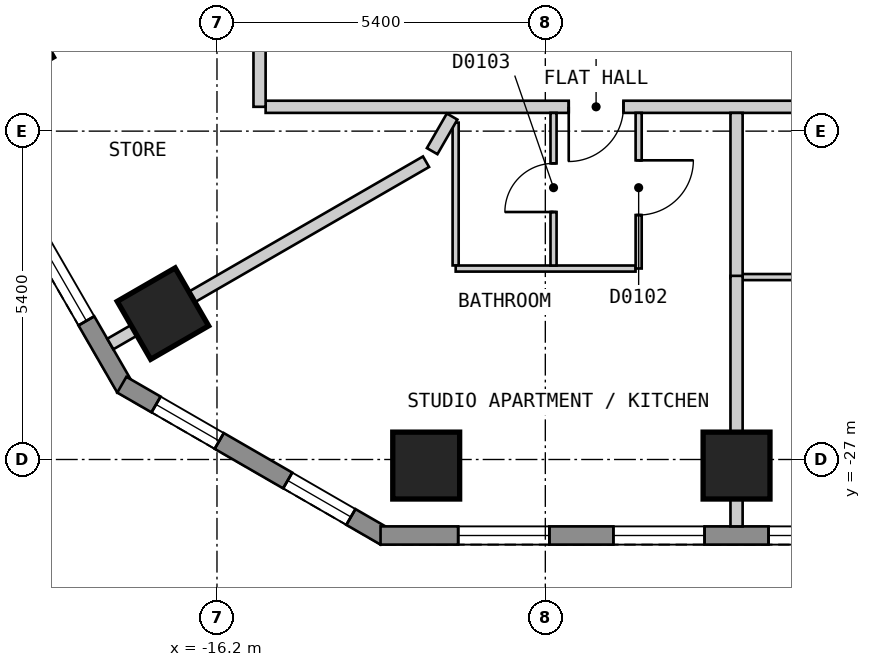
"""IFC4 building model, lengths in metres.
Left out: names, types, materials, properties, quantities, classifications, styles, units other than length and angle.
Written with IfcOpenShell. Run it as: python <this file> out.ifc"""

import sys

from ifc_helpers import new_model, si_unit, direction, frame, frame_2d, origin, origin_2d, place, context, subcontext, project, spatial, polyline, rectangle, outline, extrude, element, fill, save


model = new_model("IFC4")
c1 = context("Model", 3, precision=1e-05, world=origin(), true_north=direction((0.0, 1.0)))
c2 = subcontext(c1, "Body", "Model", "MODEL_VIEW")
j1 = project(units=[si_unit("LENGTHUNIT", "METRE"), si_unit("PLANEANGLEUNIT", "RADIAN")], contexts=[c1])
p1 = place(None, origin())
s1 = spatial("IfcSite", under=j1, at=p1, CompositionType="ELEMENT")
p2 = place(p1, origin())
s2 = spatial("IfcBuilding", under=s1, at=p2, CompositionType="ELEMENT")
p3 = place(p2, frame((0.0, 0.0, 23.4)))
s3 = spatial("IfcBuildingStorey", under=s2, at=p3, CompositionType="ELEMENT", Elevation=23.4)
for number, where, z_axis, x_axis in (
    (1, (-19.641, -20.181, 0.0), (0.0, 0.0, 1.0), (0.5, -0.866, 0.0)),
    (2, (-17.089, -24.601, 0.0), (0.0, 0.0, 1.0), (0.5, -0.866, 0.0)),
    (3, (-12.759, -27.1, 0.0), (0.0, 0.0, 1.0), (1.0, 0.0, 0.0)),
    (4, (-7.655, -27.1, 0.0), (0.0, 0.0, 1.0), (1.0, 0.0, 0.0)),
):
    element("IfcColumn", number, at=place(p3, frame(where, z_axis=z_axis, x_axis=x_axis)), inside=s3, PredefinedType="COLUMN", context=c2, shape_type="SweptSolid", body=[
        extrude(rectangle(XDim=1.1, YDim=1.1, at=origin_2d()), origin(), (0.0, 0.0, 1.0), 3.0),
    ])
p4 = place(p3, frame((-31.22, -2.425, 0.0), z_axis=(0.0, 0.0, 1.0), x_axis=(0.500001938803, -0.866024284413, 0.0)))
e5 = element("IfcWall", 5, at=p4, inside=s3, PredefinedType="SOLIDWALL", context=c2, shape_type="SweptSolid", body=[
    extrude(outline(polyline([(0.0, -0.15), (27.02, -0.15), (26.94, 0.15), (0.08, 0.15), (0.0, -0.15)])), origin(), (0.0, 0.0, 1.0), 2.7),
])
p5 = place(p4, frame((1.277, 0.0, 0.15)))
e6 = element("IfcOpeningElement", 6, at=p5, cuts=e5, PredefinedType="OPENING", context=c2, shape_type="SweptSolid", body=[
    extrude(rectangle(XDim=1.5, YDim=2.1, at=frame_2d((0.75, 1.05))), frame((0.0, 0.16, 0.0), z_axis=(0.0, -1.0, 0.0), x_axis=(1.0, 0.0, 0.0)), (0.0, 0.0, 1.0), 0.32),
])
p6 = place(p4, frame((3.829, 0.0, 0.15)))
e7 = element("IfcOpeningElement", 7, at=p6, cuts=e5, PredefinedType="OPENING", context=c2, shape_type="SweptSolid", body=[
    extrude(rectangle(XDim=1.5, YDim=2.1, at=frame_2d((0.75, 1.05))), frame((0.0, 0.16, 0.0), z_axis=(0.0, -1.0, 0.0), x_axis=(1.0, 0.0, 0.0)), (0.0, 0.0, 1.0), 0.32),
])
p7 = place(p4, frame((6.382, 0.0, 0.15)))
e8 = element("IfcOpeningElement", 8, at=p7, cuts=e5, PredefinedType="OPENING", context=c2, shape_type="SweptSolid", body=[
    extrude(rectangle(XDim=1.5, YDim=2.1, at=frame_2d((0.75, 1.05))), frame((0.0, 0.16, 0.0), z_axis=(0.0, -1.0, 0.0), x_axis=(1.0, 0.0, 0.0)), (0.0, 0.0, 1.0), 0.32),
])
p8 = place(p4, frame((8.933, 0.0, 0.15)))
e9 = element("IfcOpeningElement", 9, at=p8, cuts=e5, PredefinedType="OPENING", context=c2, shape_type="SweptSolid", body=[
    extrude(rectangle(XDim=1.5, YDim=2.1, at=frame_2d((0.75, 1.05))), frame((0.0, 0.16, 0.0), z_axis=(0.0, -1.0, 0.0), x_axis=(1.0, 0.0, 0.0)), (0.0, 0.0, 1.0), 0.32),
])
p9 = place(p4, frame((11.485, 0.0, 0.15)))
e10 = element("IfcOpeningElement", 10, at=p9, cuts=e5, PredefinedType="OPENING", context=c2, shape_type="SweptSolid", body=[
    extrude(rectangle(XDim=1.5, YDim=2.1, at=frame_2d((0.75, 1.05))), frame((0.0, 0.16, 0.0), z_axis=(0.0, -1.0, 0.0), x_axis=(1.0, 0.0, 0.0)), (0.0, 0.0, 1.0), 0.32),
])
p10 = place(p4, frame((14.037, 0.0, 0.15)))
e11 = element("IfcOpeningElement", 11, at=p10, cuts=e5, PredefinedType="OPENING", context=c2, shape_type="SweptSolid", body=[
    extrude(rectangle(XDim=1.5, YDim=2.1, at=frame_2d((0.75, 1.05))), frame((0.0, 0.16, 0.0), z_axis=(0.0, -1.0, 0.0), x_axis=(1.0, 0.0, 0.0)), (0.0, 0.0, 1.0), 0.32),
])
p11 = place(p4, frame((16.589, 0.0, 0.15)))
e12 = element("IfcOpeningElement", 12, at=p11, cuts=e5, PredefinedType="OPENING", context=c2, shape_type="SweptSolid", body=[
    extrude(rectangle(XDim=1.5, YDim=2.1, at=frame_2d((0.75, 1.05))), frame((0.0, 0.16, 0.0), z_axis=(0.0, -1.0, 0.0), x_axis=(1.0, 0.0, 0.0)), (0.0, 0.0, 1.0), 0.32),
])
p12 = place(p4, frame((19.141, 0.0, 0.15)))
e13 = element("IfcOpeningElement", 13, at=p12, cuts=e5, PredefinedType="OPENING", context=c2, shape_type="SweptSolid", body=[
    extrude(rectangle(XDim=1.5, YDim=2.1, at=frame_2d((0.75, 1.05))), frame((0.0, 0.16, 0.0), z_axis=(0.0, -1.0, 0.0), x_axis=(1.0, 0.0, 0.0)), (0.0, 0.0, 1.0), 0.32),
])
p13 = place(p4, frame((21.693, 0.0, 0.15)))
e14 = element("IfcOpeningElement", 14, at=p13, cuts=e5, PredefinedType="OPENING", context=c2, shape_type="SweptSolid", body=[
    extrude(rectangle(XDim=1.5, YDim=2.1, at=frame_2d((0.75, 1.05))), frame((0.0, 0.16, 0.0), z_axis=(0.0, -1.0, 0.0), x_axis=(1.0, 0.0, 0.0)), (0.0, 0.0, 1.0), 0.32),
])
p14 = place(p4, frame((24.244, 0.0, 0.15)))
e15 = element("IfcOpeningElement", 15, at=p14, cuts=e5, PredefinedType="OPENING", context=c2, shape_type="SweptSolid", body=[
    extrude(rectangle(XDim=1.5, YDim=2.1, at=frame_2d((0.75, 1.05))), frame((0.0, 0.16, 0.0), z_axis=(0.0, -1.0, 0.0), x_axis=(1.0, 0.0, 0.0)), (0.0, 0.0, 1.0), 0.32),
])
p15 = place(p3, frame((-17.765, -25.77, 0.0), z_axis=(0.0, 0.0, 1.0), x_axis=(0.866010750942, -0.50002537861, 0.0)))
e16 = element("IfcWall", 16, at=p15, inside=s3, PredefinedType="SOLIDWALL", context=c2, shape_type="SweptSolid", body=[
    extrude(outline(polyline([(0.0, -0.15), (5.0, -0.15), (4.919, 0.15), (0.08, 0.15), (0.0, -0.15)])), origin(), (0.0, 0.0, 1.0), 2.7),
])
p16 = place(p15, frame((0.65, 0.0, 0.15)))
e17 = element("IfcOpeningElement", 17, at=p16, cuts=e16, PredefinedType="OPENING", context=c2, shape_type="SweptSolid", body=[
    extrude(rectangle(XDim=1.2, YDim=2.1, at=frame_2d((0.6, 1.05))), frame((0.0, 0.16, 0.0), z_axis=(0.0, -1.0, 0.0), x_axis=(1.0, 0.0, 0.0)), (0.0, 0.0, 1.0), 0.32),
])
p17 = place(p15, frame((3.15, 0.0, 0.15)))
e18 = element("IfcOpeningElement", 18, at=p17, cuts=e16, PredefinedType="OPENING", context=c2, shape_type="SweptSolid", body=[
    extrude(rectangle(XDim=1.2, YDim=2.1, at=frame_2d((0.6, 1.05))), frame((0.0, 0.16, 0.0), z_axis=(0.0, -1.0, 0.0), x_axis=(1.0, 0.0, 0.0)), (0.0, 0.0, 1.0), 0.32),
])
p18 = place(p3, frame((-13.51, -28.25, 0.0), z_axis=(0.0, 0.0, 1.0), x_axis=(1.0, 0.0, 0.0)))
e19 = element("IfcWall", 19, at=p18, inside=s3, PredefinedType="SOLIDWALL", context=c2, shape_type="SweptSolid", body=[
    extrude(outline(polyline([(0.0, -0.15), (27.02, -0.15), (26.94, 0.15), (0.08, 0.15), (0.0, -0.15)])), origin(), (0.0, 0.0, 1.0), 2.7),
])
p19 = place(p18, frame((1.277, 0.0, 0.15)))
e20 = element("IfcOpeningElement", 20, at=p19, cuts=e19, PredefinedType="OPENING", context=c2, shape_type="SweptSolid", body=[
    extrude(rectangle(XDim=1.5, YDim=2.1, at=frame_2d((0.75, 1.05))), frame((0.0, 0.16, 0.0), z_axis=(0.0, -1.0, 0.0), x_axis=(1.0, 0.0, 0.0)), (0.0, 0.0, 1.0), 0.32),
])
p20 = place(p18, frame((3.829, 0.0, 0.15)))
e21 = element("IfcOpeningElement", 21, at=p20, cuts=e19, PredefinedType="OPENING", context=c2, shape_type="SweptSolid", body=[
    extrude(rectangle(XDim=1.5, YDim=2.1, at=frame_2d((0.75, 1.05))), frame((0.0, 0.16, 0.0), z_axis=(0.0, -1.0, 0.0), x_axis=(1.0, 0.0, 0.0)), (0.0, 0.0, 1.0), 0.32),
])
p21 = place(p18, frame((6.381, 0.0, 0.15)))
e22 = element("IfcOpeningElement", 22, at=p21, cuts=e19, PredefinedType="OPENING", context=c2, shape_type="SweptSolid", body=[
    extrude(rectangle(XDim=1.5, YDim=2.1, at=frame_2d((0.75, 1.05))), frame((0.0, 0.16, 0.0), z_axis=(0.0, -1.0, 0.0), x_axis=(1.0, 0.0, 0.0)), (0.0, 0.0, 1.0), 0.32),
])
p22 = place(p18, frame((8.933, 0.0, 0.15)))
e23 = element("IfcOpeningElement", 23, at=p22, cuts=e19, PredefinedType="OPENING", context=c2, shape_type="SweptSolid", body=[
    extrude(rectangle(XDim=1.5, YDim=2.1, at=frame_2d((0.75, 1.05))), frame((0.0, 0.16, 0.0), z_axis=(0.0, -1.0, 0.0), x_axis=(1.0, 0.0, 0.0)), (0.0, 0.0, 1.0), 0.32),
])
p23 = place(p18, frame((11.485, 0.0, 0.15)))
e24 = element("IfcOpeningElement", 24, at=p23, cuts=e19, PredefinedType="OPENING", context=c2, shape_type="SweptSolid", body=[
    extrude(rectangle(XDim=1.5, YDim=2.1, at=frame_2d((0.75, 1.05))), frame((0.0, 0.16, 0.0), z_axis=(0.0, -1.0, 0.0), x_axis=(1.0, 0.0, 0.0)), (0.0, 0.0, 1.0), 0.32),
])
p24 = place(p18, frame((14.037, 0.0, 0.15)))
e25 = element("IfcOpeningElement", 25, at=p24, cuts=e19, PredefinedType="OPENING", context=c2, shape_type="SweptSolid", body=[
    extrude(rectangle(XDim=1.5, YDim=2.1, at=frame_2d((0.75, 1.05))), frame((0.0, 0.16, 0.0), z_axis=(0.0, -1.0, 0.0), x_axis=(1.0, 0.0, 0.0)), (0.0, 0.0, 1.0), 0.32),
])
p25 = place(p18, frame((16.589, 0.0, 0.15)))
e26 = element("IfcOpeningElement", 26, at=p25, cuts=e19, PredefinedType="OPENING", context=c2, shape_type="SweptSolid", body=[
    extrude(rectangle(XDim=1.5, YDim=2.1, at=frame_2d((0.75, 1.05))), frame((0.0, 0.16, 0.0), z_axis=(0.0, -1.0, 0.0), x_axis=(1.0, 0.0, 0.0)), (0.0, 0.0, 1.0), 0.32),
])
p26 = place(p18, frame((19.141, 0.0, 0.15)))
e27 = element("IfcOpeningElement", 27, at=p26, cuts=e19, PredefinedType="OPENING", context=c2, shape_type="SweptSolid", body=[
    extrude(rectangle(XDim=1.5, YDim=2.1, at=frame_2d((0.75, 1.05))), frame((0.0, 0.16, 0.0), z_axis=(0.0, -1.0, 0.0), x_axis=(1.0, 0.0, 0.0)), (0.0, 0.0, 1.0), 0.32),
])
p27 = place(p18, frame((21.693, 0.0, 0.15)))
e28 = element("IfcOpeningElement", 28, at=p27, cuts=e19, PredefinedType="OPENING", context=c2, shape_type="SweptSolid", body=[
    extrude(rectangle(XDim=1.5, YDim=2.1, at=frame_2d((0.75, 1.05))), frame((0.0, 0.16, 0.0), z_axis=(0.0, -1.0, 0.0), x_axis=(1.0, 0.0, 0.0)), (0.0, 0.0, 1.0), 0.32),
])
p28 = place(p18, frame((24.245, 0.0, 0.15)))
e29 = element("IfcOpeningElement", 29, at=p28, cuts=e19, PredefinedType="OPENING", context=c2, shape_type="SweptSolid", body=[
    extrude(rectangle(XDim=1.5, YDim=2.1, at=frame_2d((0.75, 1.05))), frame((0.0, 0.16, 0.0), z_axis=(0.0, -1.0, 0.0), x_axis=(1.0, 0.0, 0.0)), (0.0, 0.0, 1.0), 0.32),
])
p29 = place(p3, frame((-15.4, -21.2, 0.0), z_axis=(0.0, 0.0, 1.0), x_axis=(1.0, 0.0, 0.0)))
e30 = element("IfcWall", 30, at=p29, inside=s3, PredefinedType="PARTITIONING", context=c2, shape_type="SweptSolid", body=[
    extrude(rectangle(XDim=30.799, YDim=0.2, at=frame_2d((15.399, 0.0))), origin(), (0.0, 0.0, 1.0), 2.7),
])
p30 = place(p29, frame((4.985, 0.0, 0.0)))
e31 = element("IfcOpeningElement", 31, at=p30, cuts=e30, PredefinedType="OPENING", context=c2, shape_type="SweptSolid", body=[
    extrude(rectangle(XDim=0.9, YDim=2.1, at=frame_2d((0.45, 1.05))), frame((0.0, 0.11, 0.0), z_axis=(0.0, -1.0, 0.0), x_axis=(1.0, 0.0, 0.0)), (0.0, 0.0, 1.0), 0.22),
])
p31 = place(p29, frame((14.901, 0.0, 0.0)))
e32 = element("IfcOpeningElement", 32, at=p31, cuts=e30, PredefinedType="OPENING", context=c2, shape_type="SweptSolid", body=[
    extrude(rectangle(XDim=1.0, YDim=2.1, at=frame_2d((0.5, 1.05))), frame((0.0, 0.11, 0.0), z_axis=(0.0, -1.0, 0.0), x_axis=(1.0, 0.0, 0.0)), (0.0, 0.0, 1.0), 0.22),
])
p32 = place(p29, frame((20.005, 0.0, 0.0)))
e33 = element("IfcOpeningElement", 33, at=p32, cuts=e30, PredefinedType="OPENING", context=c2, shape_type="SweptSolid", body=[
    extrude(rectangle(XDim=1.0, YDim=2.1, at=frame_2d((0.5, 1.05))), frame((0.0, 0.11, 0.0), z_axis=(0.0, -1.0, 0.0), x_axis=(1.0, 0.0, 0.0)), (0.0, 0.0, 1.0), 0.22),
])
p33 = place(p29, frame((24.916, 0.0, 0.0)))
e34 = element("IfcOpeningElement", 34, at=p33, cuts=e30, PredefinedType="OPENING", context=c2, shape_type="SweptSolid", body=[
    extrude(rectangle(XDim=0.9, YDim=2.1, at=frame_2d((0.45, 1.05))), frame((0.0, 0.11, 0.0), z_axis=(0.0, -1.0, 0.0), x_axis=(1.0, 0.0, 0.0)), (0.0, 0.0, 1.0), 0.22),
])
p34 = place(p3, frame((-15.5, -21.2, 0.0), z_axis=(0.0, 0.0, 1.0), x_axis=(0.0, 1.0, 0.0)))
e35 = element("IfcWall", 35, at=p34, inside=s3, PredefinedType="PARTITIONING", context=c2, shape_type="SweptSolid", body=[
    extrude(rectangle(XDim=4.8, YDim=0.2, at=frame_2d((2.4, 0.0))), origin(), (0.0, 0.0, 1.0), 2.7),
])
p35 = place(p34, frame((1.258, 0.0, 0.0)))
e36 = element("IfcOpeningElement", 36, at=p35, cuts=e35, PredefinedType="OPENING", context=c2, shape_type="SweptSolid", body=[
    extrude(rectangle(XDim=0.8, YDim=2.1, at=frame_2d((0.4, 1.05))), frame((0.0, 0.11, 0.0), z_axis=(0.0, -1.0, 0.0), x_axis=(1.0, 0.0, 0.0)), (0.0, 0.0, 1.0), 0.22),
])
p36 = place(p3, frame((-12.275, -21.46, 0.0), z_axis=(0.0, 0.0, 1.0), x_axis=(0.0, -1.0, 0.0)))
e37 = element("IfcWall", 37, at=p36, inside=s3, PredefinedType="PARTITIONING", context=c2, shape_type="SweptSolid", body=[
    extrude(rectangle(XDim=2.349, YDim=0.1, at=frame_2d((1.175, 0.0))), origin(), (0.0, 0.0, 1.0), 2.7),
])
p37 = place(p3, frame((-12.274, -23.86, 0.0), z_axis=(0.0, 0.0, 1.0), x_axis=(1.0, 0.0, 0.0)))
e38 = element("IfcWall", 38, at=p37, inside=s3, PredefinedType="PARTITIONING", context=c2, shape_type="SweptSolid", body=[
    extrude(rectangle(XDim=2.958, YDim=0.1, at=frame_2d((1.479, 0.0))), origin(), (0.0, 0.0, 1.0), 2.7),
])
p38 = place(p3, frame((-7.555, -24.0, 0.0), z_axis=(0.0, 0.0, 1.0), x_axis=(1.0, 0.0, 0.0)))
e39 = element("IfcWall", 39, at=p38, inside=s3, PredefinedType="PARTITIONING", context=c2, shape_type="SweptSolid", body=[
    extrude(rectangle(XDim=4.954, YDim=0.1, at=frame_2d((2.477, 0.0))), origin(), (0.0, 0.0, 1.0), 2.7),
])
p39 = place(p38, frame((2.052, 0.0, 0.0)))
e40 = element("IfcOpeningElement", 40, at=p39, cuts=e39, PredefinedType="OPENING", context=c2, shape_type="SweptSolid", body=[
    extrude(rectangle(XDim=0.8, YDim=2.1, at=frame_2d((0.4, 1.05))), frame((0.0, 0.06, 0.0), z_axis=(0.0, -1.0, 0.0), x_axis=(1.0, 0.0, 0.0)), (0.0, 0.0, 1.0), 0.12),
])
p40 = place(p3, frame((-9.265, -23.859, 0.0), z_axis=(0.0, 0.0, 1.0), x_axis=(0.0, 1.0, 0.0)))
e41 = element("IfcWall", 41, at=p40, inside=s3, PredefinedType="PARTITIONING", context=c2, shape_type="SweptSolid", body=[
    extrude(rectangle(XDim=2.559, YDim=0.1, at=frame_2d((1.279, 0.0))), origin(), (0.0, 0.0, 1.0), 2.7),
])
p41 = place(p40, frame((0.879, 0.0, 0.0)))
e42 = element("IfcOpeningElement", 42, at=p41, cuts=e41, PredefinedType="OPENING", context=c2, shape_type="SweptSolid", body=[
    extrude(rectangle(XDim=0.9, YDim=2.1, at=frame_2d((0.45, 1.05))), frame((0.0, 0.06, 0.0), z_axis=(0.0, -1.0, 0.0), x_axis=(1.0, 0.0, 0.0)), (0.0, 0.0, 1.0), 0.12),
])
p42 = place(p3, frame((-10.665, -23.81, 0.0), z_axis=(0.0, 0.0, 1.0), x_axis=(0.0, 1.0, 0.0)))
e43 = element("IfcWall", 43, at=p42, inside=s3, PredefinedType="PARTITIONING", context=c2, shape_type="SweptSolid", body=[
    extrude(rectangle(XDim=2.51, YDim=0.1, at=frame_2d((1.255, 0.0))), origin(), (0.0, 0.0, 1.0), 2.7),
])
p43 = place(p42, frame((0.88, 0.0, 0.0)))
e44 = element("IfcOpeningElement", 44, at=p43, cuts=e43, PredefinedType="OPENING", context=c2, shape_type="SweptSolid", body=[
    extrude(rectangle(XDim=0.8, YDim=2.1, at=frame_2d((0.4, 1.05))), frame((0.0, 0.06, 0.0), z_axis=(0.0, -1.0, 0.0), x_axis=(1.0, 0.0, 0.0)), (0.0, 0.0, 1.0), 0.12),
])
p44 = place(p3, frame((-7.655, -21.3, 0.0), z_axis=(0.0, 0.0, 1.0), x_axis=(0.0, -1.0, 0.0)))
e45 = element("IfcWall", 45, at=p44, inside=s3, PredefinedType="PARTITIONING", context=c2, shape_type="SweptSolid", body=[
    extrude(rectangle(XDim=2.72, YDim=0.2, at=frame_2d((1.36, 0.0))), origin(), (0.0, 0.0, 1.0), 2.7),
])
p45 = place(p3, frame((-12.661, -21.929, 0.0), z_axis=(0.0, 0.0, 1.0), x_axis=(0.499379051742, 0.866383611734, 0.0)))
e46 = element("IfcWall", 46, at=p45, inside=s3, PredefinedType="PARTITIONING", context=c2, shape_type="SweptSolid", body=[
    extrude(rectangle(XDim=0.656, YDim=0.2, at=frame_2d((0.328, 0.0))), origin(), (0.0, 0.0, 1.0), 2.7),
])
p46 = place(p3, frame((-7.655, -28.1, 0.0), z_axis=(0.0, 0.0, 1.0), x_axis=(0.0, 1.0, 0.0)))
e47 = element("IfcWall", 47, at=p46, inside=s3, PredefinedType="PARTITIONING", context=c2, shape_type="SweptSolid", body=[
    extrude(rectangle(XDim=4.12, YDim=0.2, at=frame_2d((2.06, 0.0))), origin(), (0.0, 0.0, 1.0), 2.7),
])
p47 = place(p3, frame((-20.507, -20.681, 0.0), z_axis=(0.0, 0.0, 1.0), x_axis=(0.866028446103, 0.499994730513, 0.0)))
e48 = element("IfcWall", 48, at=p47, inside=s3, PredefinedType="PARTITIONING", context=c2, shape_type="SweptSolid", body=[
    extrude(rectangle(XDim=5.666, YDim=0.2, at=frame_2d((2.833, 0.0))), origin(), (0.0, 0.0, 1.0), 2.7),
])
p48 = place(p3, frame((-17.954, -25.101, 0.0), z_axis=(0.0, 0.0, 1.0), x_axis=(0.865999098103, 0.500045560009, 0.0)))
e49 = element("IfcWall", 49, at=p48, inside=s3, PredefinedType="PARTITIONING", context=c2, shape_type="SweptSolid", body=[
    extrude(rectangle(XDim=5.996, YDim=0.2, at=frame_2d((2.998, 0.0))), origin(), (0.0, 0.0, 1.0), 2.7),
])
p49 = place(p14, origin())
e50 = element("IfcWindow", 50, at=p49, inside=s3, PartitioningType="SINGLE_PANEL", PredefinedType="WINDOW", context=c2, shape_type="SweptSolid", body=[
    extrude(rectangle(XDim=1.5, YDim=2.1, at=frame_2d((0.75, 1.05))), frame((0.0, 0.03, 0.0), z_axis=(0.0, -1.0, 0.0), x_axis=(1.0, 0.0, 0.0)), (0.0, 0.0, 1.0), 0.06),
])
fill(e15, e50)
p50 = place(p16, origin())
e51 = element("IfcWindow", 51, at=p50, inside=s3, PartitioningType="SINGLE_PANEL", PredefinedType="WINDOW", context=c2, shape_type="SweptSolid", body=[
    extrude(rectangle(XDim=1.2, YDim=2.1, at=frame_2d((0.6, 1.05))), frame((0.0, 0.03, 0.0), z_axis=(0.0, -1.0, 0.0), x_axis=(1.0, 0.0, 0.0)), (0.0, 0.0, 1.0), 0.06),
])
fill(e17, e51)
p51 = place(p17, origin())
e52 = element("IfcWindow", 52, at=p51, inside=s3, PartitioningType="SINGLE_PANEL", PredefinedType="WINDOW", context=c2, shape_type="SweptSolid", body=[
    extrude(rectangle(XDim=1.2, YDim=2.1, at=frame_2d((0.6, 1.05))), frame((0.0, 0.03, 0.0), z_axis=(0.0, -1.0, 0.0), x_axis=(1.0, 0.0, 0.0)), (0.0, 0.0, 1.0), 0.06),
])
fill(e18, e52)
p52 = place(p19, origin())
e53 = element("IfcWindow", 53, at=p52, inside=s3, PartitioningType="SINGLE_PANEL", PredefinedType="WINDOW", context=c2, shape_type="SweptSolid", body=[
    extrude(rectangle(XDim=1.5, YDim=2.1, at=frame_2d((0.75, 1.05))), frame((0.0, 0.03, 0.0), z_axis=(0.0, -1.0, 0.0), x_axis=(1.0, 0.0, 0.0)), (0.0, 0.0, 1.0), 0.06),
])
fill(e20, e53)
p53 = place(p20, origin())
e54 = element("IfcWindow", 54, at=p53, inside=s3, PartitioningType="SINGLE_PANEL", PredefinedType="WINDOW", context=c2, shape_type="SweptSolid", body=[
    extrude(rectangle(XDim=1.5, YDim=2.1, at=frame_2d((0.75, 1.05))), frame((0.0, 0.03, 0.0), z_axis=(0.0, -1.0, 0.0), x_axis=(1.0, 0.0, 0.0)), (0.0, 0.0, 1.0), 0.06),
])
fill(e21, e54)
p54 = place(p21, origin())
e55 = element("IfcWindow", 55, at=p54, inside=s3, PartitioningType="SINGLE_PANEL", PredefinedType="WINDOW", context=c2, shape_type="SweptSolid", body=[
    extrude(rectangle(XDim=1.5, YDim=2.1, at=frame_2d((0.75, 1.05))), frame((0.0, 0.03, 0.0), z_axis=(0.0, -1.0, 0.0), x_axis=(1.0, 0.0, 0.0)), (0.0, 0.0, 1.0), 0.06),
])
fill(e22, e55)
p55 = place(p30, origin())
e56 = element("IfcDoor", 56, at=p55, inside=s3, OperationType="SINGLE_SWING_LEFT", PredefinedType="DOOR", context=c2, shape_type="SweptSolid", body=[
    extrude(rectangle(XDim=0.9, YDim=2.1, at=frame_2d((0.45, 1.05))), frame((0.0, 0.025, 0.0), z_axis=(0.0, -1.0, 0.0), x_axis=(1.0, 0.0, 0.0)), (0.0, 0.0, 1.0), 0.05),
])
fill(e31, e56)
p56 = place(p41, origin())
e57 = element("IfcDoor", 57, at=p56, inside=s3, OperationType="SINGLE_SWING_RIGHT", PredefinedType="DOOR", context=c2, shape_type="SweptSolid", body=[
    extrude(rectangle(XDim=0.9, YDim=2.1, at=frame_2d((0.45, 1.05))), frame((0.0, 0.025, 0.0), z_axis=(0.0, -1.0, 0.0), x_axis=(1.0, 0.0, 0.0)), (0.0, 0.0, 1.0), 0.05),
])
fill(e42, e57)
p57 = place(p43, origin())
e58 = element("IfcDoor", 58, at=p57, inside=s3, OperationType="SINGLE_SWING_LEFT", PredefinedType="DOOR", context=c2, shape_type="SweptSolid", body=[
    extrude(rectangle(XDim=0.8, YDim=2.1, at=frame_2d((0.4, 1.05))), frame((0.0, 0.025, 0.0), z_axis=(0.0, -1.0, 0.0), x_axis=(1.0, 0.0, 0.0)), (0.0, 0.0, 1.0), 0.05),
])
fill(e44, e58)
save(model, sys.argv[1])
